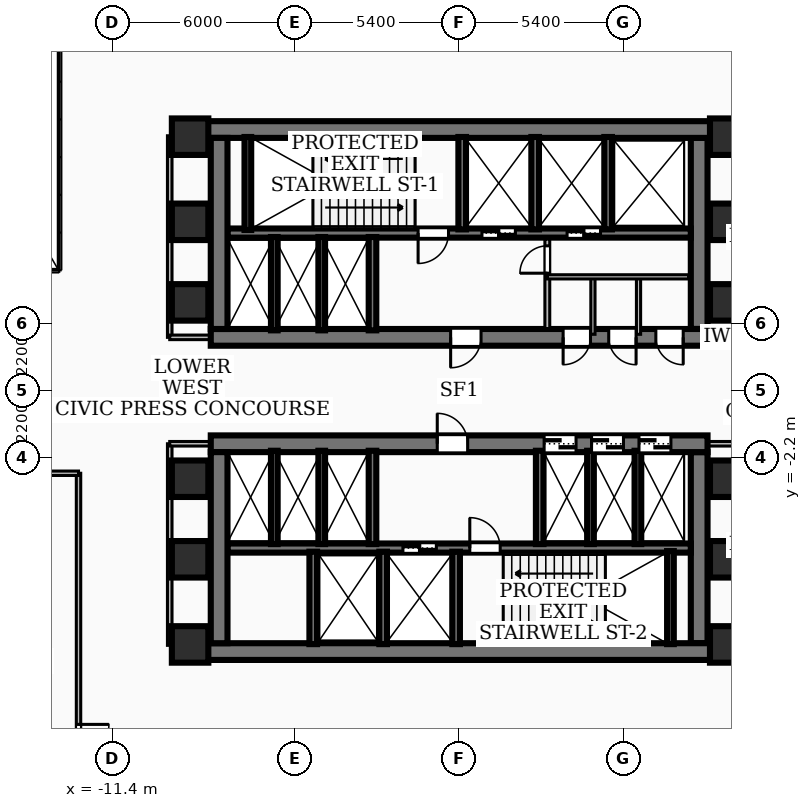
"""IFC4 building model, lengths in metres.
Left out: names, types, materials, properties, quantities, classifications, styles, units other than length and angle.
Written with IfcOpenShell. Run it as: python <this file> out.ifc"""

import sys

from ifc_helpers import new_model, si_unit, direction, frame, frame_2d, origin, origin_2d, place, context, subcontext, project, spatial, rectangle, extrude, element, fill, save


model = new_model("IFC4")
c1 = context("Model", 3, precision=1e-05, world=origin(), true_north=direction((0.0, 1.0)))
c2 = subcontext(c1, "Body", "Model", "MODEL_VIEW")
j1 = project(units=[si_unit("LENGTHUNIT", "METRE"), si_unit("PLANEANGLEUNIT", "RADIAN")], contexts=[c1])
p1 = place(None, origin())
s1 = spatial("IfcSite", under=j1, at=p1, CompositionType="ELEMENT")
p2 = place(p1, origin())
s2 = spatial("IfcBuilding", under=s1, at=p2, CompositionType="ELEMENT")
p3 = place(p2, frame((0.0, 0.0, 14.76)))
s3 = spatial("IfcBuildingStorey", under=s2, at=p3, CompositionType="ELEMENT", Elevation=14.76)
p4 = place(p3, frame((-8.78, 8.585, 0.0), z_axis=(0.0, 0.0, 1.0), x_axis=(1.0, 0.0, 0.0)))
e1 = element("IfcWall", 1, at=p4, inside=s3, PredefinedType="SHEAR", context=c2, shape_type="SweptSolid", body=[
    extrude(rectangle(XDim=17.56, YDim=0.55, at=frame_2d((8.78, 0.0))), origin(), (0.0, 0.0, 1.0), 4.28),
])
p5 = place(p3, frame((8.17, 1.75, 0.0), z_axis=(0.0, 0.0, 1.0), x_axis=(-1.0, 0.0, 0.0)))
e2 = element("IfcWall", 2, at=p5, inside=s3, PredefinedType="SHEAR", context=c2, shape_type="SweptSolid", body=[
    extrude(rectangle(XDim=16.34, YDim=0.55, at=frame_2d((8.17, 0.0))), origin(), (0.0, 0.0, 1.0), 4.28),
])
p6 = place(p5, frame((7.45, 0.0, 0.0)))
e3 = element("IfcOpeningElement", 3, at=p6, cuts=e2, PredefinedType="OPENING", context=c2, shape_type="SweptSolid", body=[
    extrude(rectangle(XDim=1.0, YDim=2.1, at=frame_2d((0.5, 1.05))), frame((0.0, 0.285, 0.0), z_axis=(0.0, -1.0, 0.0), x_axis=(1.0, 0.0, 0.0)), (0.0, 0.0, 1.0), 0.57),
])
p7 = place(p5, frame((3.85, 0.0, 0.0)))
e4 = element("IfcOpeningElement", 4, at=p7, cuts=e2, PredefinedType="OPENING", context=c2, shape_type="SweptSolid", body=[
    extrude(rectangle(XDim=0.9, YDim=2.06, at=frame_2d((0.45, 1.03))), frame((0.0, 0.285, 0.0), z_axis=(0.0, -1.0, 0.0), x_axis=(1.0, 0.0, 0.0)), (0.0, 0.0, 1.0), 0.57),
])
p8 = place(p5, frame((2.35, 0.0, 0.0)))
e5 = element("IfcOpeningElement", 5, at=p8, cuts=e2, PredefinedType="OPENING", context=c2, shape_type="SweptSolid", body=[
    extrude(rectangle(XDim=0.9, YDim=2.06, at=frame_2d((0.45, 1.03))), frame((0.0, 0.285, 0.0), z_axis=(0.0, -1.0, 0.0), x_axis=(1.0, 0.0, 0.0)), (0.0, 0.0, 1.0), 0.57),
])
p9 = place(p5, frame((0.8, 0.0, 0.0)))
e6 = element("IfcOpeningElement", 6, at=p9, cuts=e2, PredefinedType="OPENING", context=c2, shape_type="SweptSolid", body=[
    extrude(rectangle(XDim=0.9, YDim=2.06, at=frame_2d((0.45, 1.03))), frame((0.0, 0.285, 0.0), z_axis=(0.0, -1.0, 0.0), x_axis=(1.0, 0.0, 0.0)), (0.0, 0.0, 1.0), 0.57),
])
for number, where, z_axis, x_axis in (
    (7, (-7.895, 2.025, 0.0), (0.0, 0.0, 1.0), (0.0, 1.0, 0.0)),
    (8, (7.895, 8.31, 0.0), (0.0, 0.0, 1.0), (0.0, -1.0, 0.0)),
):
    element("IfcWall", number, at=place(p3, frame(where, z_axis=z_axis, x_axis=x_axis)), inside=s3, PredefinedType="SHEAR", context=c2, shape_type="SweptSolid", body=[
        extrude(rectangle(XDim=6.285, YDim=0.55, at=frame_2d((3.143, 0.0))), origin(), (0.0, 0.0, 1.0), 4.28),
    ])
p10 = place(p3, frame((7.62, 5.18, 0.0), z_axis=(0.0, 0.0, 1.0), x_axis=(-1.0, 0.0, 0.0)))
e9 = element("IfcWall", 9, at=p10, inside=s3, PredefinedType="SOLIDWALL", context=c2, shape_type="SweptSolid", body=[
    extrude(rectangle(XDim=15.24, YDim=0.3, at=frame_2d((7.62, 0.0))), origin(), (0.0, 0.0, 1.0), 4.28),
])
p11 = place(p10, frame((5.77, 0.0, 0.0)))
e10 = element("IfcOpeningElement", 10, at=p11, cuts=e9, PredefinedType="OPENING", context=c2, shape_type="SweptSolid", body=[
    extrude(rectangle(XDim=1.1, YDim=2.15, at=frame_2d((0.55, 1.075))), frame((0.0, 0.16, 0.0), z_axis=(0.0, -1.0, 0.0), x_axis=(1.0, 0.0, 0.0)), (0.0, 0.0, 1.0), 0.32),
])
p12 = place(p10, frame((2.97, 0.0, 0.0)))
e11 = element("IfcOpeningElement", 11, at=p12, cuts=e9, PredefinedType="OPENING", context=c2, shape_type="SweptSolid", body=[
    extrude(rectangle(XDim=1.1, YDim=2.15, at=frame_2d((0.55, 1.075))), frame((0.0, 0.16, 0.0), z_axis=(0.0, -1.0, 0.0), x_axis=(1.0, 0.0, 0.0)), (0.0, 0.0, 1.0), 0.32),
])
p13 = place(p10, frame((7.97, 0.0, 0.0)))
e12 = element("IfcOpeningElement", 12, at=p13, cuts=e9, PredefinedType="OPENING", context=c2, shape_type="SweptSolid", body=[
    extrude(rectangle(XDim=1.0, YDim=2.1, at=frame_2d((0.5, 1.05))), frame((0.0, 0.16, 0.0), z_axis=(0.0, -1.0, 0.0), x_axis=(1.0, 0.0, 0.0)), (0.0, 0.0, 1.0), 0.32),
])
p14 = place(p3, frame((8.78, -8.585, 0.0), z_axis=(0.0, 0.0, 1.0), x_axis=(-1.0, 0.0, 0.0)))
e13 = element("IfcWall", 13, at=p14, inside=s3, PredefinedType="SHEAR", context=c2, shape_type="SweptSolid", body=[
    extrude(rectangle(XDim=17.56, YDim=0.55, at=frame_2d((8.78, 0.0))), origin(), (0.0, 0.0, 1.0), 4.28),
])
p15 = place(p3, frame((-8.17, -1.75, 0.0), z_axis=(0.0, 0.0, 1.0), x_axis=(1.0, 0.0, 0.0)))
e14 = element("IfcWall", 14, at=p15, inside=s3, PredefinedType="SHEAR", context=c2, shape_type="SweptSolid", body=[
    extrude(rectangle(XDim=16.34, YDim=0.55, at=frame_2d((8.17, 0.0))), origin(), (0.0, 0.0, 1.0), 4.28),
])
p16 = place(p15, frame((7.45, 0.0, 0.0)))
e15 = element("IfcOpeningElement", 15, at=p16, cuts=e14, PredefinedType="OPENING", context=c2, shape_type="SweptSolid", body=[
    extrude(rectangle(XDim=1.0, YDim=2.1, at=frame_2d((0.5, 1.05))), frame((0.0, 0.285, 0.0), z_axis=(0.0, -1.0, 0.0), x_axis=(1.0, 0.0, 0.0)), (0.0, 0.0, 1.0), 0.57),
])
p17 = place(p15, frame((10.965, 0.0, 0.0)))
e16 = element("IfcOpeningElement", 16, at=p17, cuts=e14, PredefinedType="OPENING", context=c2, shape_type="SweptSolid", body=[
    extrude(rectangle(XDim=1.05, YDim=2.15, at=frame_2d((0.525, 1.075))), frame((0.0, 0.285, 0.0), z_axis=(0.0, -1.0, 0.0), x_axis=(1.0, 0.0, 0.0)), (0.0, 0.0, 1.0), 0.57),
])
p18 = place(p15, frame((12.525, 0.0, 0.0)))
e17 = element("IfcOpeningElement", 17, at=p18, cuts=e14, PredefinedType="OPENING", context=c2, shape_type="SweptSolid", body=[
    extrude(rectangle(XDim=1.05, YDim=2.15, at=frame_2d((0.525, 1.075))), frame((0.0, 0.285, 0.0), z_axis=(0.0, -1.0, 0.0), x_axis=(1.0, 0.0, 0.0)), (0.0, 0.0, 1.0), 0.57),
])
p19 = place(p15, frame((14.085, 0.0, 0.0)))
e18 = element("IfcOpeningElement", 18, at=p19, cuts=e14, PredefinedType="OPENING", context=c2, shape_type="SweptSolid", body=[
    extrude(rectangle(XDim=1.05, YDim=2.15, at=frame_2d((0.525, 1.075))), frame((0.0, 0.285, 0.0), z_axis=(0.0, -1.0, 0.0), x_axis=(1.0, 0.0, 0.0)), (0.0, 0.0, 1.0), 0.57),
])
for number, where, z_axis, x_axis in (
    (19, (-7.895, -8.31, 0.0), (0.0, 0.0, 1.0), (0.0, 1.0, 0.0)),
    (20, (7.895, -2.025, 0.0), (0.0, 0.0, 1.0), (0.0, -1.0, 0.0)),
):
    element("IfcWall", number, at=place(p3, frame(where, z_axis=z_axis, x_axis=x_axis)), inside=s3, PredefinedType="SHEAR", context=c2, shape_type="SweptSolid", body=[
        extrude(rectangle(XDim=6.285, YDim=0.55, at=frame_2d((3.143, 0.0))), origin(), (0.0, 0.0, 1.0), 4.28),
    ])
p20 = place(p3, frame((-7.62, -5.18, 0.0), z_axis=(0.0, 0.0, 1.0), x_axis=(1.0, 0.0, 0.0)))
e21 = element("IfcWall", 21, at=p20, inside=s3, PredefinedType="SOLIDWALL", context=c2, shape_type="SweptSolid", body=[
    extrude(rectangle(XDim=15.24, YDim=0.3, at=frame_2d((7.62, 0.0))), origin(), (0.0, 0.0, 1.0), 4.28),
])
p21 = place(p20, frame((5.77, 0.0, 0.0)))
e22 = element("IfcOpeningElement", 22, at=p21, cuts=e21, PredefinedType="OPENING", context=c2, shape_type="SweptSolid", body=[
    extrude(rectangle(XDim=1.1, YDim=2.15, at=frame_2d((0.55, 1.075))), frame((0.0, 0.16, 0.0), z_axis=(0.0, -1.0, 0.0), x_axis=(1.0, 0.0, 0.0)), (0.0, 0.0, 1.0), 0.32),
])
p22 = place(p20, frame((7.97, 0.0, 0.0)))
e23 = element("IfcOpeningElement", 23, at=p22, cuts=e21, PredefinedType="OPENING", context=c2, shape_type="SweptSolid", body=[
    extrude(rectangle(XDim=1.0, YDim=2.1, at=frame_2d((0.5, 1.05))), frame((0.0, 0.16, 0.0), z_axis=(0.0, -1.0, 0.0), x_axis=(1.0, 0.0, 0.0)), (0.0, 0.0, 1.0), 0.32),
])
for number, where, z_axis, x_axis in (
    (24, (-6.95, 5.28, 0.0), (0.0, 0.0, 1.0), (0.0, 1.0, 0.0)),
    (25, (6.95, -8.34, 0.0), (0.0, 0.0, 1.0), (0.0, 1.0, 0.0)),
):
    element("IfcWall", number, at=place(p3, frame(where, z_axis=z_axis, x_axis=x_axis)), inside=s3, PredefinedType="SOLIDWALL", context=c2, shape_type="SweptSolid", body=[
        extrude(rectangle(XDim=3.06, YDim=0.22, at=frame_2d((1.53, 0.0))), origin(), (0.0, 0.0, 1.0), 4.28),
    ])
for number, where, z_axis, x_axis in (
    (26, (0.1, 5.3, 0.0), (0.0, 0.0, 1.0), (0.0, 1.0, 0.0)),
    (27, (2.5, 5.3, 0.0), (0.0, 0.0, 1.0), (0.0, 1.0, 0.0)),
    (28, (4.9, 5.3, 0.0), (0.0, 0.0, 1.0), (0.0, 1.0, 0.0)),
):
    element("IfcWall", number, at=place(p3, frame(where, z_axis=z_axis, x_axis=x_axis)), inside=s3, PredefinedType="SOLIDWALL", context=c2, shape_type="SweptSolid", body=[
        extrude(rectangle(XDim=3.04, YDim=0.25, at=frame_2d((1.52, 0.0))), origin(), (0.0, 0.0, 1.0), 4.28),
    ])
p23 = place(p3, frame((-2.85, 1.98, 0.0), z_axis=(0.0, 0.0, 1.0), x_axis=(0.0, 1.0, 0.0)))
e29 = element("IfcWall", 29, at=p23, inside=s3, PredefinedType="SOLIDWALL", context=c2, shape_type="SweptSolid", body=[
    extrude(rectangle(XDim=3.07, YDim=0.25, at=frame_2d((1.535, 0.0))), origin(), (0.0, 0.0, 1.0), 4.28),
])
for number, where, z_axis, x_axis in (
    (30, (-0.1, -8.34, 0.0), (0.0, 0.0, 1.0), (0.0, 1.0, 0.0)),
    (31, (-2.5, -8.34, 0.0), (0.0, 0.0, 1.0), (0.0, 1.0, 0.0)),
    (32, (-4.8, -8.34, 0.0), (0.0, 0.0, 1.0), (0.0, 1.0, 0.0)),
):
    element("IfcWall", number, at=place(p3, frame(where, z_axis=z_axis, x_axis=x_axis)), inside=s3, PredefinedType="SOLIDWALL", context=c2, shape_type="SweptSolid", body=[
        extrude(rectangle(XDim=3.04, YDim=0.25, at=frame_2d((1.52, 0.0))), origin(), (0.0, 0.0, 1.0), 4.28),
    ])
for number, where, z_axis, x_axis in (
    (33, (-2.85, -5.05, 0.0), (0.0, 0.0, 1.0), (0.0, 1.0, 0.0)),
    (34, (2.65, -5.05, 0.0), (0.0, 0.0, 1.0), (0.0, 1.0, 0.0)),
):
    element("IfcWall", number, at=place(p3, frame(where, z_axis=z_axis, x_axis=x_axis)), inside=s3, PredefinedType="SOLIDWALL", context=c2, shape_type="SweptSolid", body=[
        extrude(rectangle(XDim=3.07, YDim=0.25, at=frame_2d((1.535, 0.0))), origin(), (0.0, 0.0, 1.0), 4.28),
    ])
for number, where, z_axis, x_axis in (
    (35, (-6.08, 1.98, 0.0), (0.0, 0.0, 1.0), (0.0, 1.0, 0.0)),
    (36, (-4.52, 1.98, 0.0), (0.0, 0.0, 1.0), (0.0, 1.0, 0.0)),
    (37, (4.32, -5.05, 0.0), (0.0, 0.0, 1.0), (0.0, 1.0, 0.0)),
    (38, (5.88, -5.05, 0.0), (0.0, 0.0, 1.0), (0.0, 1.0, 0.0)),
    (39, (-6.08, -5.05, 0.0), (0.0, 0.0, 1.0), (0.0, 1.0, 0.0)),
    (40, (-4.52, -5.05, 0.0), (0.0, 0.0, 1.0), (0.0, 1.0, 0.0)),
):
    element("IfcWall", number, at=place(p3, frame(where, z_axis=z_axis, x_axis=x_axis)), inside=s3, PredefinedType="SOLIDWALL", context=c2, shape_type="SweptSolid", body=[
        extrude(rectangle(XDim=3.07, YDim=0.22, at=frame_2d((1.535, 0.0))), origin(), (0.0, 0.0, 1.0), 4.28),
    ])
for number, where, z_axis, x_axis in (
    (41, (-8.85, -5.55, 0.0), (0.0, 0.0, 1.0), (1.0, 0.0, 0.0)),
    (42, (-8.85, -2.9, 0.0), (0.0, 0.0, 1.0), (1.0, 0.0, 0.0)),
    (43, (-8.85, 2.9, 0.0), (0.0, 0.0, 1.0), (1.0, 0.0, 0.0)),
    (44, (-8.85, 5.55, 0.0), (0.0, 0.0, 1.0), (1.0, 0.0, 0.0)),
    (45, (8.85, -5.55, 0.0), (0.0, 0.0, 1.0), (1.0, 0.0, 0.0)),
    (46, (8.85, -2.9, 0.0), (0.0, 0.0, 1.0), (1.0, 0.0, 0.0)),
    (47, (8.85, 2.9, 0.0), (0.0, 0.0, 1.0), (1.0, 0.0, 0.0)),
    (48, (8.85, 5.55, 0.0), (0.0, 0.0, 1.0), (1.0, 0.0, 0.0)),
    (49, (-8.85, 8.35, 0.0), (0.0, 0.0, 1.0), (1.0, 0.0, 0.0)),
    (50, (8.85, -8.35, 0.0), (0.0, 0.0, 1.0), (1.0, 0.0, 0.0)),
    (51, (8.85, 8.35, 0.0), (0.0, 0.0, 1.0), (1.0, 0.0, 0.0)),
    (52, (-8.85, -8.35, 0.0), (0.0, 0.0, 1.0), (1.0, 0.0, 0.0)),
):
    element("IfcColumn", number, at=place(p3, frame(where, z_axis=z_axis, x_axis=x_axis)), inside=s3, PredefinedType="COLUMN", context=c2, shape_type="SweptSolid", body=[
        extrude(rectangle(XDim=1.2, YDim=1.2, at=origin_2d()), origin(), (0.0, 0.0, 1.0), 4.68),
    ])
p24 = place(p3, frame((2.9, 2.04, 0.0), z_axis=(0.0, 0.0, 1.0), x_axis=(0.0, 1.0, 0.0)))
e53 = element("IfcWall", 53, at=p24, inside=s3, PredefinedType="PARTITIONING", context=c2, shape_type="SweptSolid", body=[
    extrude(rectangle(XDim=2.94, YDim=0.16, at=frame_2d((1.47, 0.0))), origin(), (0.0, 0.0, 1.0), 3.345),
])
p25 = place(p24, frame((1.82, 0.0, 0.0)))
e54 = element("IfcOpeningElement", 54, at=p25, cuts=e53, PredefinedType="OPENING", context=c2, shape_type="SweptSolid", body=[
    extrude(rectangle(XDim=0.9, YDim=2.06, at=frame_2d((0.45, 1.03))), frame((0.0, 0.09, 0.0), z_axis=(0.0, -1.0, 0.0), x_axis=(1.0, 0.0, 0.0)), (0.0, 0.0, 1.0), 0.18),
])
p26 = place(p3, frame((2.9, 3.74, 0.0), z_axis=(0.0, 0.0, 1.0), x_axis=(1.0, 0.0, 0.0)))
e55 = element("IfcWall", 55, at=p26, inside=s3, PredefinedType="PARTITIONING", context=c2, shape_type="SweptSolid", body=[
    extrude(rectangle(XDim=4.65, YDim=0.138, at=frame_2d((2.325, 0.0))), origin(), (0.0, 0.0, 1.0), 4.28),
])
for number, where, z_axis, x_axis in (
    (56, (4.4, 1.85, 0.0), (0.0, 0.0, 1.0), (0.0, 1.0, 0.0)),
    (57, (5.9, 1.85, 0.0), (0.0, 0.0, 1.0), (0.0, 1.0, 0.0)),
):
    element("IfcWall", number, at=place(p3, frame(where, z_axis=z_axis, x_axis=x_axis)), inside=s3, PredefinedType="PARTITIONING", context=c2, shape_type="SweptSolid", body=[
        extrude(rectangle(XDim=1.89, YDim=0.138, at=frame_2d((0.945, 0.0))), origin(), (0.0, 0.0, 1.0), 3.345),
    ])
p27 = place(p3, frame((-9.52, 1.75, 0.0), z_axis=(0.0, 0.0, 1.0), x_axis=(0.0, 1.0, 0.0)))
e58 = element("IfcWall", 58, at=p27, inside=s3, PredefinedType="PARTITIONING", context=c2, shape_type="SweptSolid", body=[
    extrude(rectangle(XDim=6.63, YDim=0.15, at=frame_2d((3.315, 0.0))), origin(), (0.0, 0.0, 1.0), 3.29),
])
p28 = place(p3, frame((-7.85, 1.75, 0.0), z_axis=(0.0, 0.0, 1.0), x_axis=(-1.0, 0.0, 0.0)))
e59 = element("IfcWall", 59, at=p28, inside=s3, PredefinedType="PARTITIONING", context=c2, shape_type="SweptSolid", body=[
    extrude(rectangle(XDim=1.67, YDim=0.15, at=frame_2d((0.835, 0.0))), origin(), (0.0, 0.0, 1.0), 3.345),
])
p29 = place(p3, frame((-9.52, -8.38, 0.0), z_axis=(0.0, 0.0, 1.0), x_axis=(0.0, 1.0, 0.0)))
e60 = element("IfcWall", 60, at=p29, inside=s3, PredefinedType="PARTITIONING", context=c2, shape_type="SweptSolid", body=[
    extrude(rectangle(XDim=6.63, YDim=0.15, at=frame_2d((3.315, 0.0))), origin(), (0.0, 0.0, 1.0), 3.29),
])
for number, where, z_axis, x_axis in (
    (61, (-7.85, -1.75, 0.0), (0.0, 0.0, 1.0), (-1.0, 0.0, 0.0)),
    (62, (7.85, 1.75, 0.0), (0.0, 0.0, 1.0), (1.0, 0.0, 0.0)),
    (63, (7.85, -1.75, 0.0), (0.0, 0.0, 1.0), (1.0, 0.0, 0.0)),
):
    element("IfcWall", number, at=place(p3, frame(where, z_axis=z_axis, x_axis=x_axis)), inside=s3, PredefinedType="PARTITIONING", context=c2, shape_type="SweptSolid", body=[
        extrude(rectangle(XDim=1.67, YDim=0.15, at=frame_2d((0.835, 0.0))), origin(), (0.0, 0.0, 1.0), 3.345),
    ])
p30 = place(p3, frame((-12.52, -2.72, 0.0), z_axis=(0.0, 0.0, 1.0), x_axis=(0.0, -1.0, 0.0)))
e64 = element("IfcWall", 64, at=p30, inside=s3, PredefinedType="PARTITIONING", context=c2, shape_type="SweptSolid", body=[
    extrude(rectangle(XDim=17.36, YDim=0.145, at=frame_2d((8.68, 0.0))), origin(), (0.0, 0.0, 1.0), 3.29),
])
p31 = place(p30, frame((8.26, 0.0, 0.0)))
e65 = element("IfcOpeningElement", 65, at=p31, cuts=e64, PredefinedType="OPENING", context=c2, shape_type="SweptSolid", body=[
    extrude(rectangle(XDim=1.0, YDim=2.1, at=frame_2d((0.5, 1.05))), frame((0.0, 0.083, 0.0), z_axis=(0.0, -1.0, 0.0), x_axis=(1.0, 0.0, 0.0)), (0.0, 0.0, 1.0), 0.165),
])
p32 = place(p3, frame((-22.4, -2.72, 0.0), z_axis=(0.0, 0.0, 1.0), x_axis=(1.0, 0.0, 0.0)))
e66 = element("IfcWall", 66, at=p32, inside=s3, PredefinedType="PARTITIONING", context=c2, shape_type="SweptSolid", body=[
    extrude(rectangle(XDim=9.88, YDim=0.145, at=frame_2d((4.94, 0.0))), origin(), (0.0, 0.0, 1.0), 4.28),
])
p33 = place(p6, origin())
e67 = element("IfcDoor", 67, at=p33, inside=s3, OperationType="SINGLE_SWING_RIGHT", PredefinedType="DOOR", context=c2, shape_type="SweptSolid", body=[
    extrude(rectangle(XDim=1.0, YDim=2.1, at=frame_2d((0.5, 1.05))), frame((0.0, 0.025, 0.0), z_axis=(0.0, -1.0, 0.0), x_axis=(1.0, 0.0, 0.0)), (0.0, 0.0, 1.0), 0.05),
])
fill(e3, e67)
p34 = place(p16, origin())
e68 = element("IfcDoor", 68, at=p34, inside=s3, OperationType="SINGLE_SWING_LEFT", PredefinedType="DOOR", context=c2, shape_type="SweptSolid", body=[
    extrude(rectangle(XDim=1.0, YDim=2.1, at=frame_2d((0.5, 1.05))), frame((0.0, 0.025, 0.0), z_axis=(0.0, -1.0, 0.0), x_axis=(1.0, 0.0, 0.0)), (0.0, 0.0, 1.0), 0.05),
])
fill(e15, e68)
p35 = place(p11, origin())
e69 = element("IfcDoor", 69, at=p35, inside=s3, OperationType="DOUBLE_DOOR_SLIDING", PredefinedType="DOOR", context=c2, shape_type="SweptSolid", body=[
    extrude(rectangle(XDim=1.1, YDim=2.15, at=frame_2d((0.55, 1.075))), frame((0.0, 0.025, 0.0), z_axis=(0.0, -1.0, 0.0), x_axis=(1.0, 0.0, 0.0)), (0.0, 0.0, 1.0), 0.05),
])
fill(e10, e69)
p36 = place(p12, origin())
e70 = element("IfcDoor", 70, at=p36, inside=s3, OperationType="DOUBLE_DOOR_SLIDING", PredefinedType="DOOR", context=c2, shape_type="SweptSolid", body=[
    extrude(rectangle(XDim=1.1, YDim=2.15, at=frame_2d((0.55, 1.075))), frame((0.0, 0.025, 0.0), z_axis=(0.0, -1.0, 0.0), x_axis=(1.0, 0.0, 0.0)), (0.0, 0.0, 1.0), 0.05),
])
fill(e11, e70)
p37 = place(p13, origin())
e71 = element("IfcDoor", 71, at=p37, inside=s3, OperationType="SINGLE_SWING_RIGHT", PredefinedType="DOOR", context=c2, shape_type="SweptSolid", body=[
    extrude(rectangle(XDim=1.0, YDim=2.1, at=frame_2d((0.5, 1.05))), frame((0.0, 0.025, 0.0), z_axis=(0.0, -1.0, 0.0), x_axis=(1.0, 0.0, 0.0)), (0.0, 0.0, 1.0), 0.05),
])
fill(e12, e71)
p38 = place(p21, origin())
e72 = element("IfcDoor", 72, at=p38, inside=s3, OperationType="DOUBLE_DOOR_SLIDING", PredefinedType="DOOR", context=c2, shape_type="SweptSolid", body=[
    extrude(rectangle(XDim=1.1, YDim=2.15, at=frame_2d((0.55, 1.075))), frame((0.0, 0.025, 0.0), z_axis=(0.0, -1.0, 0.0), x_axis=(1.0, 0.0, 0.0)), (0.0, 0.0, 1.0), 0.05),
])
fill(e22, e72)
p39 = place(p22, origin())
e73 = element("IfcDoor", 73, at=p39, inside=s3, OperationType="SINGLE_SWING_LEFT", PredefinedType="DOOR", context=c2, shape_type="SweptSolid", body=[
    extrude(rectangle(XDim=1.0, YDim=2.1, at=frame_2d((0.5, 1.05))), frame((0.0, 0.025, 0.0), z_axis=(0.0, -1.0, 0.0), x_axis=(1.0, 0.0, 0.0)), (0.0, 0.0, 1.0), 0.05),
])
fill(e23, e73)
p40 = place(p17, origin())
e74 = element("IfcDoor", 74, at=p40, inside=s3, OperationType="DOUBLE_DOOR_SLIDING", PredefinedType="DOOR", context=c2, shape_type="SweptSolid", body=[
    extrude(rectangle(XDim=1.05, YDim=2.15, at=frame_2d((0.525, 1.075))), frame((0.0, 0.025, 0.0), z_axis=(0.0, -1.0, 0.0), x_axis=(1.0, 0.0, 0.0)), (0.0, 0.0, 1.0), 0.05),
])
fill(e16, e74)
p41 = place(p18, origin())
e75 = element("IfcDoor", 75, at=p41, inside=s3, OperationType="DOUBLE_DOOR_SLIDING", PredefinedType="DOOR", context=c2, shape_type="SweptSolid", body=[
    extrude(rectangle(XDim=1.05, YDim=2.15, at=frame_2d((0.525, 1.075))), frame((0.0, 0.025, 0.0), z_axis=(0.0, -1.0, 0.0), x_axis=(1.0, 0.0, 0.0)), (0.0, 0.0, 1.0), 0.05),
])
fill(e17, e75)
p42 = place(p19, origin())
e76 = element("IfcDoor", 76, at=p42, inside=s3, OperationType="DOUBLE_DOOR_SLIDING", PredefinedType="DOOR", context=c2, shape_type="SweptSolid", body=[
    extrude(rectangle(XDim=1.05, YDim=2.15, at=frame_2d((0.525, 1.075))), frame((0.0, 0.025, 0.0), z_axis=(0.0, -1.0, 0.0), x_axis=(1.0, 0.0, 0.0)), (0.0, 0.0, 1.0), 0.05),
])
fill(e18, e76)
p43 = place(p7, origin())
e77 = element("IfcDoor", 77, at=p43, inside=s3, OperationType="SINGLE_SWING_RIGHT", PredefinedType="DOOR", context=c2, shape_type="SweptSolid", body=[
    extrude(rectangle(XDim=0.9, YDim=2.06, at=frame_2d((0.45, 1.03))), frame((0.0, 0.025, 0.0), z_axis=(0.0, -1.0, 0.0), x_axis=(1.0, 0.0, 0.0)), (0.0, 0.0, 1.0), 0.05),
])
fill(e4, e77)
p44 = place(p8, origin())
e78 = element("IfcDoor", 78, at=p44, inside=s3, OperationType="SINGLE_SWING_LEFT", PredefinedType="DOOR", context=c2, shape_type="SweptSolid", body=[
    extrude(rectangle(XDim=0.9, YDim=2.06, at=frame_2d((0.45, 1.03))), frame((0.0, 0.025, 0.0), z_axis=(0.0, -1.0, 0.0), x_axis=(1.0, 0.0, 0.0)), (0.0, 0.0, 1.0), 0.05),
])
fill(e5, e78)
p45 = place(p9, origin())
e79 = element("IfcDoor", 79, at=p45, inside=s3, OperationType="SINGLE_SWING_LEFT", PredefinedType="DOOR", context=c2, shape_type="SweptSolid", body=[
    extrude(rectangle(XDim=0.9, YDim=2.06, at=frame_2d((0.45, 1.03))), frame((0.0, 0.025, 0.0), z_axis=(0.0, -1.0, 0.0), x_axis=(1.0, 0.0, 0.0)), (0.0, 0.0, 1.0), 0.05),
])
fill(e6, e79)
p46 = place(p25, origin())
e80 = element("IfcDoor", 80, at=p46, inside=s3, OperationType="SINGLE_SWING_LEFT", PredefinedType="DOOR", context=c2, shape_type="SweptSolid", body=[
    extrude(rectangle(XDim=0.9, YDim=2.06, at=frame_2d((0.45, 1.03))), frame((0.0, 0.025, 0.0), z_axis=(0.0, -1.0, 0.0), x_axis=(1.0, 0.0, 0.0)), (0.0, 0.0, 1.0), 0.05),
])
fill(e54, e80)
p47 = place(p31, origin())
e81 = element("IfcDoor", 81, at=p47, inside=s3, OperationType="SINGLE_SWING_LEFT", PredefinedType="DOOR", context=c2, shape_type="SweptSolid", body=[
    extrude(rectangle(XDim=1.0, YDim=2.1, at=frame_2d((0.5, 1.05))), frame((0.0, 0.025, 0.0), z_axis=(0.0, -1.0, 0.0), x_axis=(1.0, 0.0, 0.0)), (0.0, 0.0, 1.0), 0.05),
])
fill(e65, e81)
save(model, sys.argv[1])
